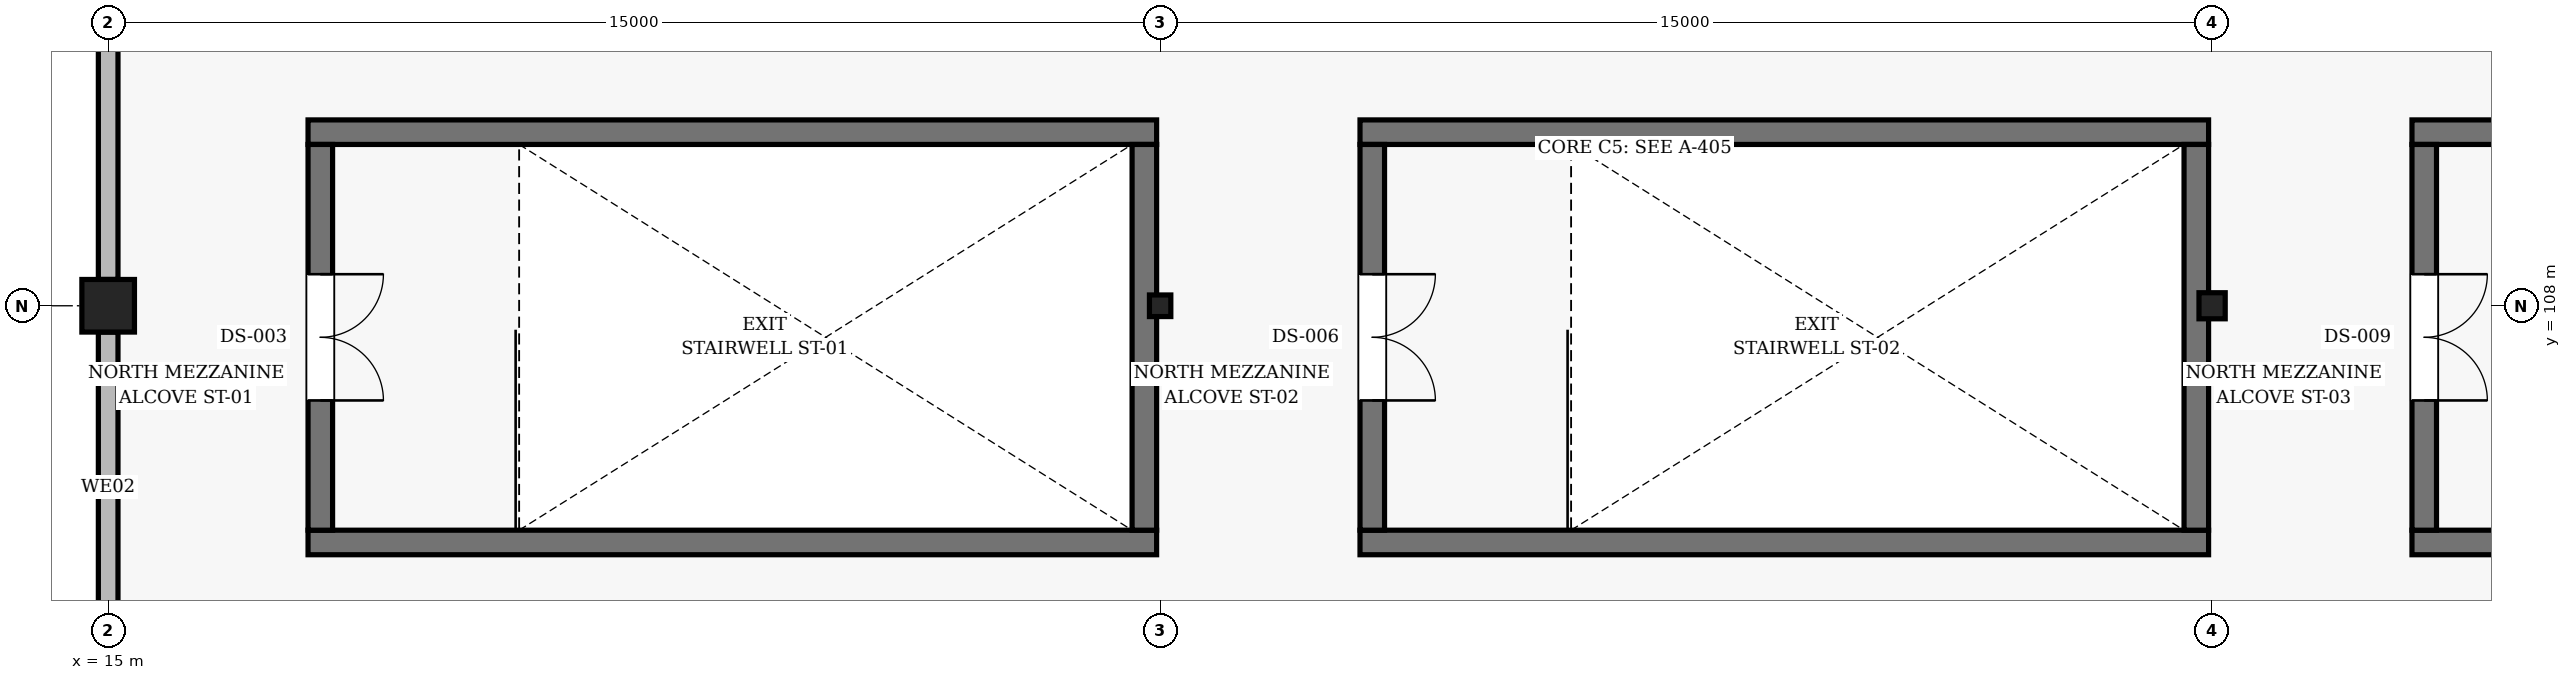
"""IFC4 building model, lengths in metres.
Left out: names, types, materials, properties, quantities, classifications, styles, units other than length and angle.
Written with IfcOpenShell. Run it as: python <this file> out.ifc"""

import sys

from ifc_helpers import new_model, si_unit, direction, frame, frame_2d, origin, origin_2d, place, context, subcontext, project, spatial, rectangle, i_section, extrude, element, fill, save


model = new_model("IFC4")
c1 = context("Model", 3, precision=1e-05, world=origin(), true_north=direction((0.0, 1.0)))
c2 = subcontext(c1, "Body", "Model", "MODEL_VIEW")
j1 = project(units=[si_unit("LENGTHUNIT", "METRE"), si_unit("PLANEANGLEUNIT", "RADIAN")], contexts=[c1])
p1 = place(None, origin())
s1 = spatial("IfcSite", under=j1, at=p1, CompositionType="ELEMENT")
p2 = place(p1, origin())
s2 = spatial("IfcBuilding", under=s1, at=p2, CompositionType="ELEMENT")
p3 = place(p2, frame((0.0, 0.0, 5.4)))
s3 = spatial("IfcBuildingStorey", under=s2, at=p3, CompositionType="ELEMENT", Elevation=5.4)
p4 = place(p3, frame((15.0, 108.0, 0.0), z_axis=(0.0, 0.0, 1.0), x_axis=(1.0, 0.0, 0.0)))
e1 = element("IfcColumn", 1, at=p4, inside=s3, PredefinedType="COLUMN", context=c2, shape_type="SweptSolid", body=[
    extrude(rectangle(XDim=0.75, YDim=0.75, at=origin_2d()), origin(), (0.0, 0.0, 1.0), 5.205),
])
p5 = place(p3, frame((30.0, 108.0, 0.0), z_axis=(0.0, 0.0, 1.0), x_axis=(1.0, 0.0, 0.0)))
e2 = element("IfcColumn", 2, at=p5, inside=s3, PredefinedType="COLUMN", context=c2, shape_type="SweptSolid", body=[
    extrude(i_section(OverallWidth=0.305, OverallDepth=0.308, WebThickness=0.01, FlangeThickness=0.015, FilletRadius=0.015, at=origin_2d()), origin(), (0.0, 0.0, 1.0), 5.205),
])
p6 = place(p3, frame((45.0, 108.0, 0.0), z_axis=(0.0, 0.0, 1.0), x_axis=(1.0, 0.0, 0.0)))
e3 = element("IfcColumn", 3, at=p6, inside=s3, PredefinedType="COLUMN", context=c2, shape_type="SweptSolid", body=[
    extrude(i_section(OverallWidth=0.374, OverallDepth=0.372, WebThickness=0.016, FlangeThickness=0.026, FilletRadius=0.016, at=origin_2d()), origin(), (0.0, 0.0, 1.0), 5.205),
])
p7 = place(p3, frame((15.0, 103.203, 0.0), z_axis=(0.0, 0.0, 1.0), x_axis=(0.0, 1.0, 0.0)))
e4 = element("IfcWall", 4, at=p7, inside=s3, PredefinedType="SOLIDWALL", context=c2, shape_type="SweptSolid", body=[
    extrude(rectangle(XDim=4.422, YDim=0.28, at=frame_2d((2.211, 0.0))), origin(), (0.0, 0.0, 1.0), 4.579),
])
p8 = place(p3, frame((15.0, 108.375, 0.0), z_axis=(0.0, 0.0, 1.0), x_axis=(0.0, 1.0, 0.0)))
e5 = element("IfcWall", 5, at=p8, inside=s3, PredefinedType="SOLIDWALL", context=c2, shape_type="SweptSolid", body=[
    extrude(rectangle(XDim=8.439, YDim=0.28, at=frame_2d((4.219, 0.0))), origin(), (0.0, 0.0, 1.0), 4.417),
])
p9 = place(p8, frame((3.52, 0.0, 0.95)))
e6 = element("IfcOpeningElement", 6, at=p9, cuts=e5, PredefinedType="OPENING", context=c2, shape_type="SweptSolid", body=[
    extrude(rectangle(XDim=1.4, YDim=1.7, at=frame_2d((0.7, 0.85))), frame((0.0, 0.15, 0.0), z_axis=(0.0, -1.0, 0.0), x_axis=(1.0, 0.0, 0.0)), (0.0, 0.0, 1.0), 0.3),
])
for number, where, z_axis, x_axis in (
    (7, (17.85, 104.625, 0.0), (0.0, 0.0, 1.0), (1.0, 0.0, 0.0)),
    (8, (29.95, 110.475, 0.0), (0.0, 0.0, 1.0), (-1.0, 0.0, 0.0)),
):
    element("IfcWall", number, at=place(p3, frame(where, z_axis=z_axis, x_axis=x_axis)), inside=s3, PredefinedType="SHEAR", context=c2, shape_type="SweptSolid", body=[
        extrude(rectangle(XDim=12.1, YDim=0.35, at=frame_2d((6.05, 0.0))), origin(), (0.0, 0.0, 1.0), 5.205),
    ])
p10 = place(p3, frame((18.025, 110.3, 0.0), z_axis=(0.0, 0.0, 1.0), x_axis=(0.0, -1.0, 0.0)))
e9 = element("IfcWall", 9, at=p10, inside=s3, PredefinedType="SHEAR", context=c2, shape_type="SweptSolid", body=[
    extrude(rectangle(XDim=5.5, YDim=0.35, at=frame_2d((2.75, 0.0))), origin(), (0.0, 0.0, 1.0), 5.205),
])
p11 = place(p10, frame((1.85, 0.0, 0.0)))
e10 = element("IfcOpeningElement", 10, at=p11, cuts=e9, PredefinedType="OPENING", context=c2, shape_type="SweptSolid", body=[
    extrude(rectangle(XDim=1.8, YDim=2.2, at=frame_2d((0.9, 1.1))), frame((0.0, 0.185, 0.0), z_axis=(0.0, -1.0, 0.0), x_axis=(1.0, 0.0, 0.0)), (0.0, 0.0, 1.0), 0.37),
])
p12 = place(p3, frame((29.775, 104.8, 0.0), z_axis=(0.0, 0.0, 1.0), x_axis=(0.0, 1.0, 0.0)))
e11 = element("IfcWall", 11, at=p12, inside=s3, PredefinedType="SHEAR", context=c2, shape_type="SweptSolid", body=[
    extrude(rectangle(XDim=5.5, YDim=0.35, at=frame_2d((2.75, 0.0))), origin(), (0.0, 0.0, 1.0), 5.205),
])
for number, where, z_axis, x_axis in (
    (12, (32.85, 104.625, 0.0), (0.0, 0.0, 1.0), (1.0, 0.0, 0.0)),
    (13, (44.95, 110.475, 0.0), (0.0, 0.0, 1.0), (-1.0, 0.0, 0.0)),
):
    element("IfcWall", number, at=place(p3, frame(where, z_axis=z_axis, x_axis=x_axis)), inside=s3, PredefinedType="SHEAR", context=c2, shape_type="SweptSolid", body=[
        extrude(rectangle(XDim=12.1, YDim=0.35, at=frame_2d((6.05, 0.0))), origin(), (0.0, 0.0, 1.0), 5.205),
    ])
p13 = place(p3, frame((33.025, 110.3, 0.0), z_axis=(0.0, 0.0, 1.0), x_axis=(0.0, -1.0, 0.0)))
e14 = element("IfcWall", 14, at=p13, inside=s3, PredefinedType="SHEAR", context=c2, shape_type="SweptSolid", body=[
    extrude(rectangle(XDim=5.5, YDim=0.35, at=frame_2d((2.75, 0.0))), origin(), (0.0, 0.0, 1.0), 5.205),
])
p14 = place(p13, frame((1.85, 0.0, 0.0)))
e15 = element("IfcOpeningElement", 15, at=p14, cuts=e14, PredefinedType="OPENING", context=c2, shape_type="SweptSolid", body=[
    extrude(rectangle(XDim=1.8, YDim=2.2, at=frame_2d((0.9, 1.1))), frame((0.0, 0.185, 0.0), z_axis=(0.0, -1.0, 0.0), x_axis=(1.0, 0.0, 0.0)), (0.0, 0.0, 1.0), 0.37),
])
p15 = place(p3, frame((44.775, 104.8, 0.0), z_axis=(0.0, 0.0, 1.0), x_axis=(0.0, 1.0, 0.0)))
e16 = element("IfcWall", 16, at=p15, inside=s3, PredefinedType="SHEAR", context=c2, shape_type="SweptSolid", body=[
    extrude(rectangle(XDim=5.5, YDim=0.35, at=frame_2d((2.75, 0.0))), origin(), (0.0, 0.0, 1.0), 5.205),
])
for number, where, z_axis, x_axis in (
    (17, (47.85, 104.625, 0.0), (0.0, 0.0, 1.0), (1.0, 0.0, 0.0)),
    (18, (59.95, 110.475, 0.0), (0.0, 0.0, 1.0), (-1.0, 0.0, 0.0)),
):
    element("IfcWall", number, at=place(p3, frame(where, z_axis=z_axis, x_axis=x_axis)), inside=s3, PredefinedType="SHEAR", context=c2, shape_type="SweptSolid", body=[
        extrude(rectangle(XDim=12.1, YDim=0.35, at=frame_2d((6.05, 0.0))), origin(), (0.0, 0.0, 1.0), 5.205),
    ])
p16 = place(p3, frame((48.025, 110.3, 0.0), z_axis=(0.0, 0.0, 1.0), x_axis=(0.0, -1.0, 0.0)))
e19 = element("IfcWall", 19, at=p16, inside=s3, PredefinedType="SHEAR", context=c2, shape_type="SweptSolid", body=[
    extrude(rectangle(XDim=5.5, YDim=0.35, at=frame_2d((2.75, 0.0))), origin(), (0.0, 0.0, 1.0), 5.205),
])
p17 = place(p16, frame((1.85, 0.0, 0.0)))
e20 = element("IfcOpeningElement", 20, at=p17, cuts=e19, PredefinedType="OPENING", context=c2, shape_type="SweptSolid", body=[
    extrude(rectangle(XDim=1.8, YDim=2.2, at=frame_2d((0.9, 1.1))), frame((0.0, 0.185, 0.0), z_axis=(0.0, -1.0, 0.0), x_axis=(1.0, 0.0, 0.0)), (0.0, 0.0, 1.0), 0.37),
])
p18 = place(p11, origin())
e21 = element("IfcDoor", 21, at=p18, inside=s3, OperationType="DOUBLE_DOOR_SINGLE_SWING", PredefinedType="DOOR", context=c2, shape_type="SweptSolid", body=[
    extrude(rectangle(XDim=1.8, YDim=2.2, at=frame_2d((0.9, 1.1))), frame((0.0, 0.025, 0.0), z_axis=(0.0, -1.0, 0.0), x_axis=(1.0, 0.0, 0.0)), (0.0, 0.0, 1.0), 0.05),
])
fill(e10, e21)
p19 = place(p14, origin())
e22 = element("IfcDoor", 22, at=p19, inside=s3, OperationType="DOUBLE_DOOR_SINGLE_SWING", PredefinedType="DOOR", context=c2, shape_type="SweptSolid", body=[
    extrude(rectangle(XDim=1.8, YDim=2.2, at=frame_2d((0.9, 1.1))), frame((0.0, 0.025, 0.0), z_axis=(0.0, -1.0, 0.0), x_axis=(1.0, 0.0, 0.0)), (0.0, 0.0, 1.0), 0.05),
])
fill(e15, e22)
p20 = place(p17, origin())
e23 = element("IfcDoor", 23, at=p20, inside=s3, OperationType="DOUBLE_DOOR_SINGLE_SWING", PredefinedType="DOOR", context=c2, shape_type="SweptSolid", body=[
    extrude(rectangle(XDim=1.8, YDim=2.2, at=frame_2d((0.9, 1.1))), frame((0.0, 0.025, 0.0), z_axis=(0.0, -1.0, 0.0), x_axis=(1.0, 0.0, 0.0)), (0.0, 0.0, 1.0), 0.05),
])
fill(e20, e23)
save(model, sys.argv[1])
